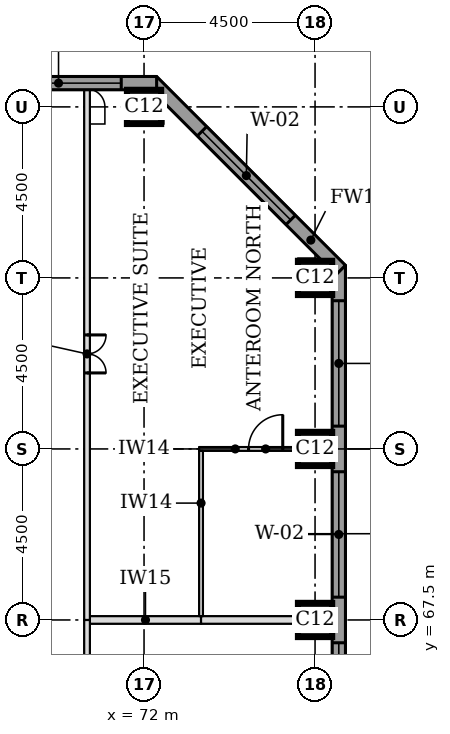
"""IFC4 building model, lengths in metres.
Left out: names, types, materials, properties, quantities, classifications, styles, units other than length and angle.
Written with IfcOpenShell. Run it as: python <this file> out.ifc"""

import sys

from ifc_helpers import new_model, si_unit, direction, frame, frame_2d, origin, origin_2d, place, context, subcontext, project, spatial, rectangle, extrude, element, fill, save


model = new_model("IFC4")
c1 = context("Model", 3, precision=1e-05, world=origin(), true_north=direction((0.0, 1.0)))
c2 = subcontext(c1, "Body", "Model", "MODEL_VIEW")
j1 = project(units=[si_unit("LENGTHUNIT", "METRE"), si_unit("PLANEANGLEUNIT", "RADIAN")], contexts=[c1])
p1 = place(None, origin())
s1 = spatial("IfcSite", under=j1, at=p1, CompositionType="ELEMENT")
p2 = place(p1, origin())
s2 = spatial("IfcBuilding", under=s1, at=p2, CompositionType="ELEMENT")
p3 = place(p2, frame((0.0, 0.0, 256.3)))
s3 = spatial("IfcBuildingStorey", under=s2, at=p3, CompositionType="ELEMENT", Elevation=256.3)
for number, where, z_axis, x_axis in (
    (1, (76.5, 67.5, 0.0), (0.0, 0.0, 1.0), (1.0, 0.0, 0.0)),
    (2, (76.5, 72.0, 0.0), (0.0, 0.0, 1.0), (1.0, 0.0, 0.0)),
    (3, (76.5, 76.5, 0.0), (0.0, 0.0, 1.0), (1.0, 0.0, 0.0)),
    (4, (72.0, 81.0, 0.0), (0.0, 0.0, 1.0), (1.0, 0.0, 0.0)),
):
    element("IfcColumn", number, at=place(p3, frame(where, z_axis=z_axis, x_axis=x_axis)), inside=s3, PredefinedType="COLUMN", context=c2, shape_type="SweptSolid", body=[
        extrude(rectangle(XDim=0.9, YDim=0.9, at=origin_2d()), origin(), (0.0, 0.0, 1.0), 3.7),
    ])
p4 = place(p3, frame((77.125, 44.669, 0.0), z_axis=(0.0, 0.0, 1.0), x_axis=(0.0, 1.0, 0.0)))
e5 = element("IfcWall", 5, at=p4, inside=s3, PredefinedType="STANDARD", context=c2, shape_type="SweptSolid", body=[
    extrude(rectangle(XDim=32.163, YDim=0.35, at=frame_2d((16.081, 0.0))), origin(), (0.0, 0.0, 1.0), 3.525),
])
p5 = place(p4, frame((0.931, 0.0, 0.9)))
e6 = element("IfcOpeningElement", 6, at=p5, cuts=e5, PredefinedType="OPENING", context=c2, shape_type="SweptSolid", body=[
    extrude(rectangle(XDim=3.3, YDim=1.9, at=frame_2d((1.65, 0.95))), frame((0.0, 0.185, 0.0), z_axis=(0.0, -1.0, 0.0), x_axis=(1.0, 0.0, 0.0)), (0.0, 0.0, 1.0), 0.37),
])
p6 = place(p4, frame((5.431, 0.0, 0.9)))
e7 = element("IfcOpeningElement", 7, at=p6, cuts=e5, PredefinedType="OPENING", context=c2, shape_type="SweptSolid", body=[
    extrude(rectangle(XDim=3.3, YDim=1.9, at=frame_2d((1.65, 0.95))), frame((0.0, 0.185, 0.0), z_axis=(0.0, -1.0, 0.0), x_axis=(1.0, 0.0, 0.0)), (0.0, 0.0, 1.0), 0.37),
])
p7 = place(p4, frame((9.931, 0.0, 0.9)))
e8 = element("IfcOpeningElement", 8, at=p7, cuts=e5, PredefinedType="OPENING", context=c2, shape_type="SweptSolid", body=[
    extrude(rectangle(XDim=3.3, YDim=1.9, at=frame_2d((1.65, 0.95))), frame((0.0, 0.185, 0.0), z_axis=(0.0, -1.0, 0.0), x_axis=(1.0, 0.0, 0.0)), (0.0, 0.0, 1.0), 0.37),
])
p8 = place(p4, frame((14.431, 0.0, 0.9)))
e9 = element("IfcOpeningElement", 9, at=p8, cuts=e5, PredefinedType="OPENING", context=c2, shape_type="SweptSolid", body=[
    extrude(rectangle(XDim=3.3, YDim=1.9, at=frame_2d((1.65, 0.95))), frame((0.0, 0.185, 0.0), z_axis=(0.0, -1.0, 0.0), x_axis=(1.0, 0.0, 0.0)), (0.0, 0.0, 1.0), 0.37),
])
p9 = place(p4, frame((18.931, 0.0, 0.9)))
e10 = element("IfcOpeningElement", 10, at=p9, cuts=e5, PredefinedType="OPENING", context=c2, shape_type="SweptSolid", body=[
    extrude(rectangle(XDim=3.3, YDim=1.9, at=frame_2d((1.65, 0.95))), frame((0.0, 0.185, 0.0), z_axis=(0.0, -1.0, 0.0), x_axis=(1.0, 0.0, 0.0)), (0.0, 0.0, 1.0), 0.37),
])
p10 = place(p4, frame((23.431, 0.0, 0.9)))
e11 = element("IfcOpeningElement", 11, at=p10, cuts=e5, PredefinedType="OPENING", context=c2, shape_type="SweptSolid", body=[
    extrude(rectangle(XDim=3.3, YDim=1.9, at=frame_2d((1.65, 0.95))), frame((0.0, 0.185, 0.0), z_axis=(0.0, -1.0, 0.0), x_axis=(1.0, 0.0, 0.0)), (0.0, 0.0, 1.0), 0.37),
])
p11 = place(p4, frame((27.931, 0.0, 0.9)))
e12 = element("IfcOpeningElement", 12, at=p11, cuts=e5, PredefinedType="OPENING", context=c2, shape_type="SweptSolid", body=[
    extrude(rectangle(XDim=3.3, YDim=1.9, at=frame_2d((1.65, 0.95))), frame((0.0, 0.185, 0.0), z_axis=(0.0, -1.0, 0.0), x_axis=(1.0, 0.0, 0.0)), (0.0, 0.0, 1.0), 0.37),
])
p12 = place(p3, frame((77.176, 76.708, 0.0), z_axis=(0.0, 0.0, 1.0), x_axis=(-0.707106781187, 0.707106781187, 0.0)))
e13 = element("IfcWall", 13, at=p12, inside=s3, PredefinedType="STANDARD", context=c2, shape_type="SweptSolid", body=[
    extrude(rectangle(XDim=7.027, YDim=0.35, at=frame_2d((3.513, 0.0))), origin(), (0.0, 0.0, 1.0), 3.525),
])
p13 = place(p12, frame((1.863, 0.0, 0.9)))
e14 = element("IfcOpeningElement", 14, at=p13, cuts=e13, PredefinedType="OPENING", context=c2, shape_type="SweptSolid", body=[
    extrude(rectangle(XDim=3.3, YDim=1.9, at=frame_2d((1.65, 0.95))), frame((0.0, 0.185, 0.0), z_axis=(0.0, -1.0, 0.0), x_axis=(1.0, 0.0, 0.0)), (0.0, 0.0, 1.0), 0.37),
])
p14 = place(p3, frame((72.331, 81.625, 0.0), z_axis=(0.0, 0.0, 1.0), x_axis=(-1.0, 0.0, 0.0)))
e15 = element("IfcWall", 15, at=p14, inside=s3, PredefinedType="STANDARD", context=c2, shape_type="SweptSolid", body=[
    extrude(rectangle(XDim=32.163, YDim=0.35, at=frame_2d((16.081, 0.0))), origin(), (0.0, 0.0, 1.0), 3.525),
])
p15 = place(p14, frame((0.931, 0.0, 0.9)))
e16 = element("IfcOpeningElement", 16, at=p15, cuts=e15, PredefinedType="OPENING", context=c2, shape_type="SweptSolid", body=[
    extrude(rectangle(XDim=3.3, YDim=1.9, at=frame_2d((1.65, 0.95))), frame((0.0, 0.185, 0.0), z_axis=(0.0, -1.0, 0.0), x_axis=(1.0, 0.0, 0.0)), (0.0, 0.0, 1.0), 0.37),
])
p16 = place(p14, frame((5.431, 0.0, 0.9)))
e17 = element("IfcOpeningElement", 17, at=p16, cuts=e15, PredefinedType="OPENING", context=c2, shape_type="SweptSolid", body=[
    extrude(rectangle(XDim=3.3, YDim=1.9, at=frame_2d((1.65, 0.95))), frame((0.0, 0.185, 0.0), z_axis=(0.0, -1.0, 0.0), x_axis=(1.0, 0.0, 0.0)), (0.0, 0.0, 1.0), 0.37),
])
p17 = place(p14, frame((9.931, 0.0, 0.9)))
e18 = element("IfcOpeningElement", 18, at=p17, cuts=e15, PredefinedType="OPENING", context=c2, shape_type="SweptSolid", body=[
    extrude(rectangle(XDim=3.3, YDim=1.9, at=frame_2d((1.65, 0.95))), frame((0.0, 0.185, 0.0), z_axis=(0.0, -1.0, 0.0), x_axis=(1.0, 0.0, 0.0)), (0.0, 0.0, 1.0), 0.37),
])
p18 = place(p14, frame((14.431, 0.0, 0.9)))
e19 = element("IfcOpeningElement", 19, at=p18, cuts=e15, PredefinedType="OPENING", context=c2, shape_type="SweptSolid", body=[
    extrude(rectangle(XDim=3.3, YDim=1.9, at=frame_2d((1.65, 0.95))), frame((0.0, 0.185, 0.0), z_axis=(0.0, -1.0, 0.0), x_axis=(1.0, 0.0, 0.0)), (0.0, 0.0, 1.0), 0.37),
])
p19 = place(p14, frame((18.931, 0.0, 0.9)))
e20 = element("IfcOpeningElement", 20, at=p19, cuts=e15, PredefinedType="OPENING", context=c2, shape_type="SweptSolid", body=[
    extrude(rectangle(XDim=3.3, YDim=1.9, at=frame_2d((1.65, 0.95))), frame((0.0, 0.185, 0.0), z_axis=(0.0, -1.0, 0.0), x_axis=(1.0, 0.0, 0.0)), (0.0, 0.0, 1.0), 0.37),
])
p20 = place(p14, frame((23.431, 0.0, 0.9)))
e21 = element("IfcOpeningElement", 21, at=p20, cuts=e15, PredefinedType="OPENING", context=c2, shape_type="SweptSolid", body=[
    extrude(rectangle(XDim=3.3, YDim=1.9, at=frame_2d((1.65, 0.95))), frame((0.0, 0.185, 0.0), z_axis=(0.0, -1.0, 0.0), x_axis=(1.0, 0.0, 0.0)), (0.0, 0.0, 1.0), 0.37),
])
p21 = place(p14, frame((27.931, 0.0, 0.9)))
e22 = element("IfcOpeningElement", 22, at=p21, cuts=e15, PredefinedType="OPENING", context=c2, shape_type="SweptSolid", body=[
    extrude(rectangle(XDim=3.3, YDim=1.9, at=frame_2d((1.65, 0.95))), frame((0.0, 0.185, 0.0), z_axis=(0.0, -1.0, 0.0), x_axis=(1.0, 0.0, 0.0)), (0.0, 0.0, 1.0), 0.37),
])
p22 = place(p3, frame((70.575, 67.5, 0.0), z_axis=(0.0, 0.0, 1.0), x_axis=(1.0, 0.0, 0.0)))
e23 = element("IfcWall", 23, at=p22, inside=s3, PredefinedType="PARTITIONING", context=c2, shape_type="SweptSolid", body=[
    extrude(rectangle(XDim=2.925, YDim=0.2, at=frame_2d((1.462, 0.0))), origin(), (0.0, 0.0, 1.0), 3.55),
])
p23 = place(p3, frame((73.5, 67.5, 0.0), z_axis=(0.0, 0.0, 1.0), x_axis=(1.0, 0.0, 0.0)))
e24 = element("IfcWall", 24, at=p23, inside=s3, PredefinedType="PARTITIONING", context=c2, shape_type="SweptSolid", body=[
    extrude(rectangle(XDim=3.45, YDim=0.2, at=frame_2d((1.725, 0.0))), origin(), (0.0, 0.0, 1.0), 3.55),
])
p24 = place(p3, frame((73.45, 72.0, 0.0), z_axis=(0.0, 0.0, 1.0), x_axis=(1.0, 0.0, 0.0)))
e25 = element("IfcWall", 25, at=p24, inside=s3, PredefinedType="PARTITIONING", context=c2, shape_type="SweptSolid", body=[
    extrude(rectangle(XDim=3.5, YDim=0.1, at=frame_2d((1.75, 0.0))), origin(), (0.0, 0.0, 1.0), 3.55),
])
p25 = place(p24, frame((1.3, 0.0, 0.0)))
e26 = element("IfcOpeningElement", 26, at=p25, cuts=e25, PredefinedType="OPENING", context=c2, shape_type="SweptSolid", body=[
    extrude(rectangle(XDim=0.9, YDim=2.1, at=frame_2d((0.45, 1.05))), frame((0.0, 0.06, 0.0), z_axis=(0.0, -1.0, 0.0), x_axis=(1.0, 0.0, 0.0)), (0.0, 0.0, 1.0), 0.12),
])
p26 = place(p3, frame((70.5, 45.0, 0.0), z_axis=(0.0, 0.0, 1.0), x_axis=(0.0, 1.0, 0.0)))
e27 = element("IfcWall", 27, at=p26, inside=s3, PredefinedType="PARTITIONING", context=c2, shape_type="SweptSolid", body=[
    extrude(rectangle(XDim=22.5, YDim=0.15, at=frame_2d((11.25, 0.0))), origin(), (0.0, 0.0, 1.0), 3.55),
])
p27 = place(p26, frame((10.75, 0.0, 0.0)))
e28 = element("IfcOpeningElement", 28, at=p27, cuts=e27, PredefinedType="OPENING", context=c2, shape_type="SweptSolid", body=[
    extrude(rectangle(XDim=1.0, YDim=2.1, at=frame_2d((0.5, 1.05))), frame((0.0, 0.085, 0.0), z_axis=(0.0, -1.0, 0.0), x_axis=(1.0, 0.0, 0.0)), (0.0, 0.0, 1.0), 0.17),
])
p28 = place(p3, frame((70.5, 67.5, 0.0), z_axis=(0.0, 0.0, 1.0), x_axis=(0.0, 1.0, 0.0)))
e29 = element("IfcWall", 29, at=p28, inside=s3, PredefinedType="PARTITIONING", context=c2, shape_type="SweptSolid", body=[
    extrude(rectangle(XDim=13.95, YDim=0.15, at=frame_2d((6.975, 0.0))), origin(), (0.0, 0.0, 1.0), 3.55),
])
p29 = place(p28, frame((6.5, 0.0, 0.0)))
e30 = element("IfcOpeningElement", 30, at=p29, cuts=e29, PredefinedType="OPENING", context=c2, shape_type="SweptSolid", body=[
    extrude(rectangle(XDim=1.0, YDim=2.1, at=frame_2d((0.5, 1.05))), frame((0.0, 0.085, 0.0), z_axis=(0.0, -1.0, 0.0), x_axis=(1.0, 0.0, 0.0)), (0.0, 0.0, 1.0), 0.17),
])
p30 = place(p3, frame((73.5, 67.6, 0.0), z_axis=(0.0, 0.0, 1.0), x_axis=(0.0, 1.0, 0.0)))
e31 = element("IfcWall", 31, at=p30, inside=s3, PredefinedType="PARTITIONING", context=c2, shape_type="SweptSolid", body=[
    extrude(rectangle(XDim=4.35, YDim=0.1, at=frame_2d((2.175, 0.0))), origin(), (0.0, 0.0, 1.0), 3.55),
])
p31 = place(p9, origin())
e32 = element("IfcWindow", 32, at=p31, inside=s3, PartitioningType="SINGLE_PANEL", PredefinedType="WINDOW", context=c2, shape_type="SweptSolid", body=[
    extrude(rectangle(XDim=3.3, YDim=1.9, at=frame_2d((1.65, 0.95))), frame((0.0, 0.085, 0.0), z_axis=(0.0, -1.0, 0.0), x_axis=(1.0, 0.0, 0.0)), (0.0, 0.0, 1.0), 0.06),
])
fill(e10, e32)
p32 = place(p10, origin())
e33 = element("IfcWindow", 33, at=p32, inside=s3, PartitioningType="SINGLE_PANEL", PredefinedType="WINDOW", context=c2, shape_type="SweptSolid", body=[
    extrude(rectangle(XDim=3.3, YDim=1.9, at=frame_2d((1.65, 0.95))), frame((0.0, 0.085, 0.0), z_axis=(0.0, -1.0, 0.0), x_axis=(1.0, 0.0, 0.0)), (0.0, 0.0, 1.0), 0.06),
])
fill(e11, e33)
p33 = place(p11, origin())
e34 = element("IfcWindow", 34, at=p33, inside=s3, PartitioningType="SINGLE_PANEL", PredefinedType="WINDOW", context=c2, shape_type="SweptSolid", body=[
    extrude(rectangle(XDim=3.3, YDim=1.9, at=frame_2d((1.65, 0.95))), frame((0.0, 0.085, 0.0), z_axis=(0.0, -1.0, 0.0), x_axis=(1.0, 0.0, 0.0)), (0.0, 0.0, 1.0), 0.06),
])
fill(e12, e34)
p34 = place(p13, origin())
e35 = element("IfcWindow", 35, at=p34, inside=s3, PartitioningType="SINGLE_PANEL", PredefinedType="WINDOW", context=c2, shape_type="SweptSolid", body=[
    extrude(rectangle(XDim=3.3, YDim=1.9, at=frame_2d((1.65, 0.95))), frame((0.0, 0.085, 0.0), z_axis=(0.0, -1.0, 0.0), x_axis=(1.0, 0.0, 0.0)), (0.0, 0.0, 1.0), 0.06),
])
fill(e14, e35)
p35 = place(p15, origin())
e36 = element("IfcWindow", 36, at=p35, inside=s3, PartitioningType="SINGLE_PANEL", PredefinedType="WINDOW", context=c2, shape_type="SweptSolid", body=[
    extrude(rectangle(XDim=3.3, YDim=1.9, at=frame_2d((1.65, 0.95))), frame((0.0, 0.085, 0.0), z_axis=(0.0, -1.0, 0.0), x_axis=(1.0, 0.0, 0.0)), (0.0, 0.0, 1.0), 0.06),
])
fill(e16, e36)
p36 = place(p29, frame((1.0, 0.0, 0.0), z_axis=(0.0, 0.0, 1.0), x_axis=(-1.0, 0.0, 0.0)))
e37 = element("IfcDoor", 37, at=p36, inside=s3, OperationType="DOUBLE_DOOR_SINGLE_SWING", PredefinedType="DOOR", context=c2, shape_type="SweptSolid", body=[
    extrude(rectangle(XDim=1.0, YDim=2.1, at=frame_2d((0.5, 1.05))), frame((0.0, 0.025, 0.0), z_axis=(0.0, -1.0, 0.0), x_axis=(1.0, 0.0, 0.0)), (0.0, 0.0, 1.0), 0.05),
])
fill(e30, e37)
p37 = place(p25, origin())
e38 = element("IfcDoor", 38, at=p37, inside=s3, OperationType="SINGLE_SWING_RIGHT", PredefinedType="DOOR", context=c2, shape_type="SweptSolid", body=[
    extrude(rectangle(XDim=0.9, YDim=2.1, at=frame_2d((0.45, 1.05))), frame((0.0, 0.025, 0.0), z_axis=(0.0, -1.0, 0.0), x_axis=(1.0, 0.0, 0.0)), (0.0, 0.0, 1.0), 0.05),
])
fill(e26, e38)
save(model, sys.argv[1])
